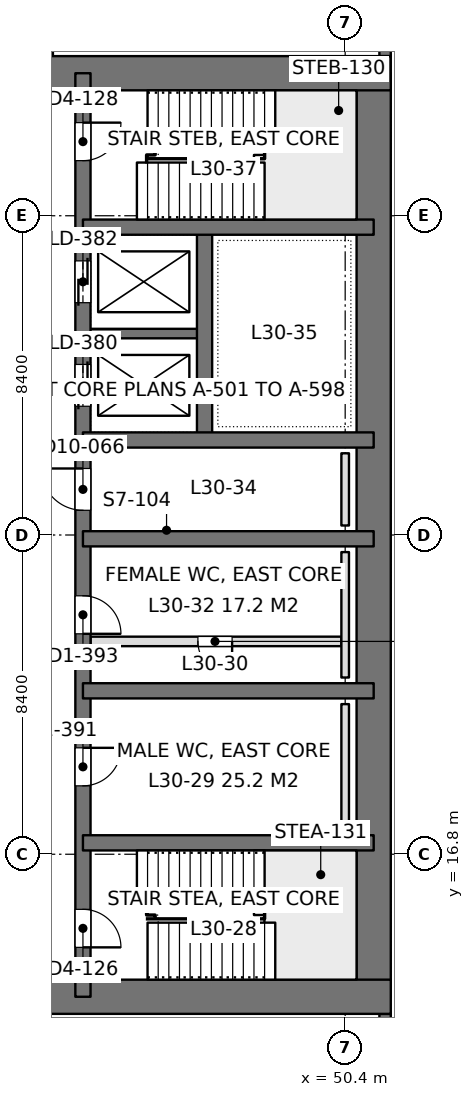
"""IFC4 building model, lengths in metres.
Left out: names, types, materials, properties, quantities, classifications, styles, units other than length and angle.
Written with IfcOpenShell. Run it as: python <this file> out.ifc"""

import sys

from ifc_helpers import new_model, si_unit, direction, frame, frame_2d, origin, place, context, subcontext, project, spatial, rectangle, extrude, element, fill, save


model = new_model("IFC4")
c1 = context("Model", 3, precision=1e-05, world=origin(), true_north=direction((0.0, 1.0)))
c2 = subcontext(c1, "Body", "Model", "MODEL_VIEW")
j1 = project(units=[si_unit("LENGTHUNIT", "METRE"), si_unit("PLANEANGLEUNIT", "RADIAN")], contexts=[c1])
p1 = place(None, origin())
s1 = spatial("IfcSite", under=j1, at=p1, CompositionType="ELEMENT")
p2 = place(p1, origin())
s2 = spatial("IfcBuilding", under=s1, at=p2, CompositionType="ELEMENT")
p3 = place(p2, frame((0.0, 0.0, 134.4)))
s3 = spatial("IfcBuildingStorey", under=s2, at=p3, CompositionType="ELEMENT", Elevation=134.4)
p4 = place(p3, frame((33.6, 13.05, 0.0), z_axis=(0.0, 0.0, 1.0), x_axis=(1.0, 0.0, 0.0)))
e1 = element("IfcWall", 1, at=p4, inside=s3, PredefinedType="SHEAR", context=c2, shape_type="SweptSolid", body=[
    extrude(rectangle(XDim=18.0, YDim=0.9, at=frame_2d((9.0, 0.0))), origin(), (0.0, 0.0, 1.0), 4.2),
])
p5 = place(p4, frame((7.25, 0.0, 0.0)))
e2 = element("IfcOpeningElement", 2, at=p5, cuts=e1, PredefinedType="OPENING", context=c2, shape_type="SweptSolid", body=[
    extrude(rectangle(XDim=1.8, YDim=2.4, at=frame_2d((0.9, 1.2))), frame((0.0, 0.46, 0.0), z_axis=(0.0, -1.0, 0.0), x_axis=(1.0, 0.0, 0.0)), (0.0, 0.0, 1.0), 0.92),
])
p6 = place(p3, frame((33.6, 37.35, 0.0), z_axis=(0.0, 0.0, 1.0), x_axis=(1.0, 0.0, 0.0)))
e3 = element("IfcWall", 3, at=p6, inside=s3, PredefinedType="SHEAR", context=c2, shape_type="SweptSolid", body=[
    extrude(rectangle(XDim=18.0, YDim=0.9, at=frame_2d((9.0, 0.0))), origin(), (0.0, 0.0, 1.0), 4.2),
])
p7 = place(p6, frame((7.25, 0.0, 0.0)))
e4 = element("IfcOpeningElement", 4, at=p7, cuts=e3, PredefinedType="OPENING", context=c2, shape_type="SweptSolid", body=[
    extrude(rectangle(XDim=1.8, YDim=2.4, at=frame_2d((0.9, 1.2))), frame((0.0, 0.46, 0.0), z_axis=(0.0, -1.0, 0.0), x_axis=(1.0, 0.0, 0.0)), (0.0, 0.0, 1.0), 0.92),
])
p8 = place(p3, frame((51.15, 13.05, 0.0), z_axis=(0.0, 0.0, 1.0), x_axis=(0.0, 1.0, 0.0)))
e5 = element("IfcWall", 5, at=p8, inside=s3, PredefinedType="SHEAR", context=c2, shape_type="SweptSolid", body=[
    extrude(rectangle(XDim=24.3, YDim=0.9, at=frame_2d((12.15, 0.0))), origin(), (0.0, 0.0, 1.0), 4.2),
])
p9 = place(p3, frame((43.5, 13.05, 0.0), z_axis=(0.0, 0.0, 1.0), x_axis=(0.0, 1.0, 0.0)))
e6 = element("IfcWall", 6, at=p9, inside=s3, PredefinedType="SHEAR", context=c2, shape_type="SweptSolid", body=[
    extrude(rectangle(XDim=24.3, YDim=0.4, at=frame_2d((12.15, 0.0))), origin(), (0.0, 0.0, 1.0), 4.2),
])
p10 = place(p9, frame((1.3, 0.0, 0.0)))
e7 = element("IfcOpeningElement", 7, at=p10, cuts=e6, PredefinedType="OPENING", context=c2, shape_type="SweptSolid", body=[
    extrude(rectangle(XDim=1.0, YDim=2.2, at=frame_2d((0.5, 1.1))), frame((0.0, 0.21, 0.0), z_axis=(0.0, -1.0, 0.0), x_axis=(1.0, 0.0, 0.0)), (0.0, 0.0, 1.0), 0.42),
])
p11 = place(p9, frame((22.0, 0.0, 0.0)))
e8 = element("IfcOpeningElement", 8, at=p11, cuts=e6, PredefinedType="OPENING", context=c2, shape_type="SweptSolid", body=[
    extrude(rectangle(XDim=1.0, YDim=2.2, at=frame_2d((0.5, 1.1))), frame((0.0, 0.21, 0.0), z_axis=(0.0, -1.0, 0.0), x_axis=(1.0, 0.0, 0.0)), (0.0, 0.0, 1.0), 0.42),
])
p12 = place(p9, frame((5.55, 0.0, 0.0)))
e9 = element("IfcOpeningElement", 9, at=p12, cuts=e6, PredefinedType="OPENING", context=c2, shape_type="SweptSolid", body=[
    extrude(rectangle(XDim=1.0, YDim=2.2, at=frame_2d((0.5, 1.1))), frame((0.0, 0.21, 0.0), z_axis=(0.0, -1.0, 0.0), x_axis=(1.0, 0.0, 0.0)), (0.0, 0.0, 1.0), 0.42),
])
p13 = place(p9, frame((9.55, 0.0, 0.0)))
e10 = element("IfcOpeningElement", 10, at=p13, cuts=e6, PredefinedType="OPENING", context=c2, shape_type="SweptSolid", body=[
    extrude(rectangle(XDim=1.0, YDim=2.2, at=frame_2d((0.5, 1.1))), frame((0.0, 0.21, 0.0), z_axis=(0.0, -1.0, 0.0), x_axis=(1.0, 0.0, 0.0)), (0.0, 0.0, 1.0), 0.42),
])
p14 = place(p9, frame((12.8, 0.0, 0.0)))
e11 = element("IfcOpeningElement", 11, at=p14, cuts=e6, PredefinedType="OPENING", context=c2, shape_type="SweptSolid", body=[
    extrude(rectangle(XDim=1.1, YDim=2.2, at=frame_2d((0.55, 1.1))), frame((0.0, 0.21, 0.0), z_axis=(0.0, -1.0, 0.0), x_axis=(1.0, 0.0, 0.0)), (0.0, 0.0, 1.0), 0.42),
])
p15 = place(p9, frame((15.538, 0.0, 0.0)))
e12 = element("IfcOpeningElement", 12, at=p15, cuts=e6, PredefinedType="OPENING", context=c2, shape_type="SweptSolid", body=[
    extrude(rectangle(XDim=1.1, YDim=2.2, at=frame_2d((0.55, 1.1))), frame((0.0, 0.21, 0.0), z_axis=(0.0, -1.0, 0.0), x_axis=(1.0, 0.0, 0.0)), (0.0, 0.0, 1.0), 0.42),
])
p16 = place(p9, frame((18.262, 0.0, 0.0)))
e13 = element("IfcOpeningElement", 13, at=p16, cuts=e6, PredefinedType="OPENING", context=c2, shape_type="SweptSolid", body=[
    extrude(rectangle(XDim=1.1, YDim=2.2, at=frame_2d((0.55, 1.1))), frame((0.0, 0.21, 0.0), z_axis=(0.0, -1.0, 0.0), x_axis=(1.0, 0.0, 0.0)), (0.0, 0.0, 1.0), 0.42),
])
for number, where, z_axis, x_axis in (
    (14, (51.15, 17.1, 0.0), (0.0, 0.0, 1.0), (-1.0, 0.0, 0.0)),
    (15, (51.15, 21.1, 0.0), (0.0, 0.0, 1.0), (-1.0, 0.0, 0.0)),
    (16, (51.15, 25.1, 0.0), (0.0, 0.0, 1.0), (-1.0, 0.0, 0.0)),
    (17, (51.15, 27.7, 0.0), (0.0, 0.0, 1.0), (-1.0, 0.0, 0.0)),
    (18, (51.15, 33.3, 0.0), (0.0, 0.0, 1.0), (-1.0, 0.0, 0.0)),
):
    element("IfcWall", number, at=place(p3, frame(where, z_axis=z_axis, x_axis=x_axis)), inside=s3, PredefinedType="SHEAR", context=c2, shape_type="SweptSolid", body=[
        extrude(rectangle(XDim=7.65, YDim=0.4, at=frame_2d((3.825, 0.0))), origin(), (0.0, 0.0, 1.0), 4.2),
    ])
p17 = place(p3, frame((46.7, 27.7, 0.0), z_axis=(0.0, 0.0, 1.0), x_axis=(0.0, 1.0, 0.0)))
e19 = element("IfcWall", 19, at=p17, inside=s3, PredefinedType="SHEAR", context=c2, shape_type="SweptSolid", body=[
    extrude(rectangle(XDim=5.6, YDim=0.4, at=frame_2d((2.8, 0.0))), origin(), (0.0, 0.0, 1.0), 4.2),
])
p18 = place(p3, frame((46.7, 30.5, 0.0), z_axis=(0.0, 0.0, 1.0), x_axis=(-1.0, 0.0, 0.0)))
e20 = element("IfcWall", 20, at=p18, inside=s3, PredefinedType="SHEAR", context=c2, shape_type="SweptSolid", body=[
    extrude(rectangle(XDim=3.2, YDim=0.25, at=frame_2d((1.6, 0.0))), origin(), (0.0, 0.0, 1.0), 4.2),
])
p19 = place(p3, frame((51.45, 42.0, 0.0), z_axis=(0.0, 0.0, 1.0), x_axis=(0.0, -1.0, 0.0)))
e21 = element("IfcWall", 21, at=p19, inside=s3, PredefinedType="SOLIDWALL", context=c2, shape_type="SweptSolid", body=[
    extrude(rectangle(XDim=4.2, YDim=0.3, at=frame_2d((2.1, 0.0))), origin(), (0.0, 0.0, 1.0), 4.05),
])
p20 = place(p19, frame((0.9, 0.0, 0.9)))
e22 = element("IfcOpeningElement", 22, at=p20, cuts=e21, PredefinedType="OPENING", context=c2, shape_type="SweptSolid", body=[
    extrude(rectangle(XDim=2.4, YDim=1.9, at=frame_2d((1.2, 0.95))), frame((0.0, 0.16, 0.0), z_axis=(0.0, -1.0, 0.0), x_axis=(1.0, 0.0, 0.0)), (0.0, 0.0, 1.0), 0.32),
])
p21 = place(p3, frame((51.45, 12.6, 0.0), z_axis=(0.0, 0.0, 1.0), x_axis=(0.0, -1.0, 0.0)))
e23 = element("IfcWall", 23, at=p21, inside=s3, PredefinedType="SOLIDWALL", context=c2, shape_type="SweptSolid", body=[
    extrude(rectangle(XDim=4.2, YDim=0.3, at=frame_2d((2.1, 0.0))), origin(), (0.0, 0.0, 1.0), 4.05),
])
p22 = place(p21, frame((0.9, 0.0, 0.9)))
e24 = element("IfcOpeningElement", 24, at=p22, cuts=e23, PredefinedType="OPENING", context=c2, shape_type="SweptSolid", body=[
    extrude(rectangle(XDim=2.4, YDim=1.9, at=frame_2d((1.2, 0.95))), frame((0.0, 0.16, 0.0), z_axis=(0.0, -1.0, 0.0), x_axis=(1.0, 0.0, 0.0)), (0.0, 0.0, 1.0), 0.32),
])
p23 = place(p3, frame((42.65, 37.8, 0.0), z_axis=(0.0, 0.0, 1.0), x_axis=(0.0, 1.0, 0.0)))
e25 = element("IfcWall", 25, at=p23, inside=s3, PredefinedType="PARTITIONING", context=c2, shape_type="SweptSolid", body=[
    extrude(rectangle(XDim=2.0, YDim=0.12, at=frame_2d((1.0, 0.0))), origin(), (0.0, 0.0, 1.0), 4.05),
])
p24 = place(p3, frame((43.7, 22.4, 0.0), z_axis=(0.0, 0.0, 1.0), x_axis=(1.0, 0.0, 0.0)))
e26 = element("IfcWall", 26, at=p24, inside=s3, PredefinedType="PARTITIONING", context=c2, shape_type="SweptSolid", body=[
    extrude(rectangle(XDim=6.6, YDim=0.25, at=frame_2d((3.3, 0.0))), origin(), (0.0, 0.0, 1.0), 4.0),
])
p25 = place(p24, frame((2.825, 0.0, 0.0)))
e27 = element("IfcOpeningElement", 27, at=p25, cuts=e26, PredefinedType="OPENING", context=c2, shape_type="SweptSolid", body=[
    extrude(rectangle(XDim=0.9, YDim=2.2, at=frame_2d((0.45, 1.1))), frame((0.0, 0.135, 0.0), z_axis=(0.0, -1.0, 0.0), x_axis=(1.0, 0.0, 0.0)), (0.0, 0.0, 1.0), 0.27),
])
for number, where, z_axis, x_axis in (
    (28, (50.4, 17.45, 0.0), (0.0, 0.0, 1.0), (0.0, 1.0, 0.0)),
    (29, (50.4, 21.45, 0.0), (0.0, 0.0, 1.0), (0.0, 1.0, 0.0)),
):
    element("IfcWall", number, at=place(p3, frame(where, z_axis=z_axis, x_axis=x_axis)), inside=s3, PredefinedType="PLUMBINGWALL", context=c2, shape_type="SweptSolid", body=[
        extrude(rectangle(XDim=3.3, YDim=0.2, at=frame_2d((1.65, 0.0))), origin(), (0.0, 0.0, 1.0), 1.2),
    ])
p26 = place(p3, frame((50.4, 25.45, 0.0), z_axis=(0.0, 0.0, 1.0), x_axis=(0.0, 1.0, 0.0)))
e30 = element("IfcWall", 30, at=p26, inside=s3, PredefinedType="PLUMBINGWALL", context=c2, shape_type="SweptSolid", body=[
    extrude(rectangle(XDim=1.9, YDim=0.2, at=frame_2d((0.95, 0.0))), origin(), (0.0, 0.0, 1.0), 1.2),
])
p27 = place(p10, frame((1.0, 0.0, 0.0), z_axis=(0.0, 0.0, 1.0), x_axis=(-1.0, 0.0, 0.0)))
e31 = element("IfcDoor", 31, at=p27, inside=s3, OperationType="SINGLE_SWING_RIGHT", PredefinedType="DOOR", context=c2, shape_type="SweptSolid", body=[
    extrude(rectangle(XDim=1.0, YDim=2.2, at=frame_2d((0.5, 1.1))), frame((0.0, 0.025, 0.0), z_axis=(0.0, -1.0, 0.0), x_axis=(1.0, 0.0, 0.0)), (0.0, 0.0, 1.0), 0.05),
])
fill(e7, e31)
p28 = place(p11, frame((1.0, 0.0, 0.0), z_axis=(0.0, 0.0, 1.0), x_axis=(-1.0, 0.0, 0.0)))
e32 = element("IfcDoor", 32, at=p28, inside=s3, OperationType="SINGLE_SWING_LEFT", PredefinedType="DOOR", context=c2, shape_type="SweptSolid", body=[
    extrude(rectangle(XDim=1.0, YDim=2.2, at=frame_2d((0.5, 1.1))), frame((0.0, 0.025, 0.0), z_axis=(0.0, -1.0, 0.0), x_axis=(1.0, 0.0, 0.0)), (0.0, 0.0, 1.0), 0.05),
])
fill(e8, e32)
p29 = place(p12, frame((1.0, 0.0, 0.0), z_axis=(0.0, 0.0, 1.0), x_axis=(-1.0, 0.0, 0.0)))
e33 = element("IfcDoor", 33, at=p29, inside=s3, OperationType="SINGLE_SWING_LEFT", PredefinedType="DOOR", context=c2, shape_type="SweptSolid", body=[
    extrude(rectangle(XDim=1.0, YDim=2.2, at=frame_2d((0.5, 1.1))), frame((0.0, 0.025, 0.0), z_axis=(0.0, -1.0, 0.0), x_axis=(1.0, 0.0, 0.0)), (0.0, 0.0, 1.0), 0.05),
])
fill(e9, e33)
p30 = place(p13, frame((1.0, 0.0, 0.0), z_axis=(0.0, 0.0, 1.0), x_axis=(-1.0, 0.0, 0.0)))
e34 = element("IfcDoor", 34, at=p30, inside=s3, OperationType="SINGLE_SWING_RIGHT", PredefinedType="DOOR", context=c2, shape_type="SweptSolid", body=[
    extrude(rectangle(XDim=1.0, YDim=2.2, at=frame_2d((0.5, 1.1))), frame((0.0, 0.025, 0.0), z_axis=(0.0, -1.0, 0.0), x_axis=(1.0, 0.0, 0.0)), (0.0, 0.0, 1.0), 0.05),
])
fill(e10, e34)
p31 = place(p14, origin())
e35 = element("IfcDoor", 35, at=p31, inside=s3, OperationType="SINGLE_SWING_RIGHT", PredefinedType="DOOR", context=c2, shape_type="SweptSolid", body=[
    extrude(rectangle(XDim=1.1, YDim=2.2, at=frame_2d((0.55, 1.1))), frame((0.0, 0.025, 0.0), z_axis=(0.0, -1.0, 0.0), x_axis=(1.0, 0.0, 0.0)), (0.0, 0.0, 1.0), 0.05),
])
fill(e11, e35)
p32 = place(p15, origin())
e36 = element("IfcDoor", 36, at=p32, inside=s3, OperationType="DOUBLE_DOOR_SLIDING", PredefinedType="DOOR", context=c2, shape_type="SweptSolid", body=[
    extrude(rectangle(XDim=1.1, YDim=2.2, at=frame_2d((0.55, 1.1))), frame((0.0, 0.025, 0.0), z_axis=(0.0, -1.0, 0.0), x_axis=(1.0, 0.0, 0.0)), (0.0, 0.0, 1.0), 0.05),
])
fill(e12, e36)
p33 = place(p16, origin())
e37 = element("IfcDoor", 37, at=p33, inside=s3, OperationType="DOUBLE_DOOR_SLIDING", PredefinedType="DOOR", context=c2, shape_type="SweptSolid", body=[
    extrude(rectangle(XDim=1.1, YDim=2.2, at=frame_2d((0.55, 1.1))), frame((0.0, 0.025, 0.0), z_axis=(0.0, -1.0, 0.0), x_axis=(1.0, 0.0, 0.0)), (0.0, 0.0, 1.0), 0.05),
])
fill(e13, e37)
p34 = place(p25, frame((0.9, 0.0, 0.0), z_axis=(0.0, 0.0, 1.0), x_axis=(-1.0, 0.0, 0.0)))
e38 = element("IfcDoor", 38, at=p34, inside=s3, OperationType="SINGLE_SWING_LEFT", PredefinedType="DOOR", context=c2, shape_type="SweptSolid", body=[
    extrude(rectangle(XDim=0.9, YDim=2.2, at=frame_2d((0.45, 1.1))), frame((0.0, 0.025, 0.0), z_axis=(0.0, -1.0, 0.0), x_axis=(1.0, 0.0, 0.0)), (0.0, 0.0, 1.0), 0.05),
])
fill(e27, e38)
save(model, sys.argv[1])
